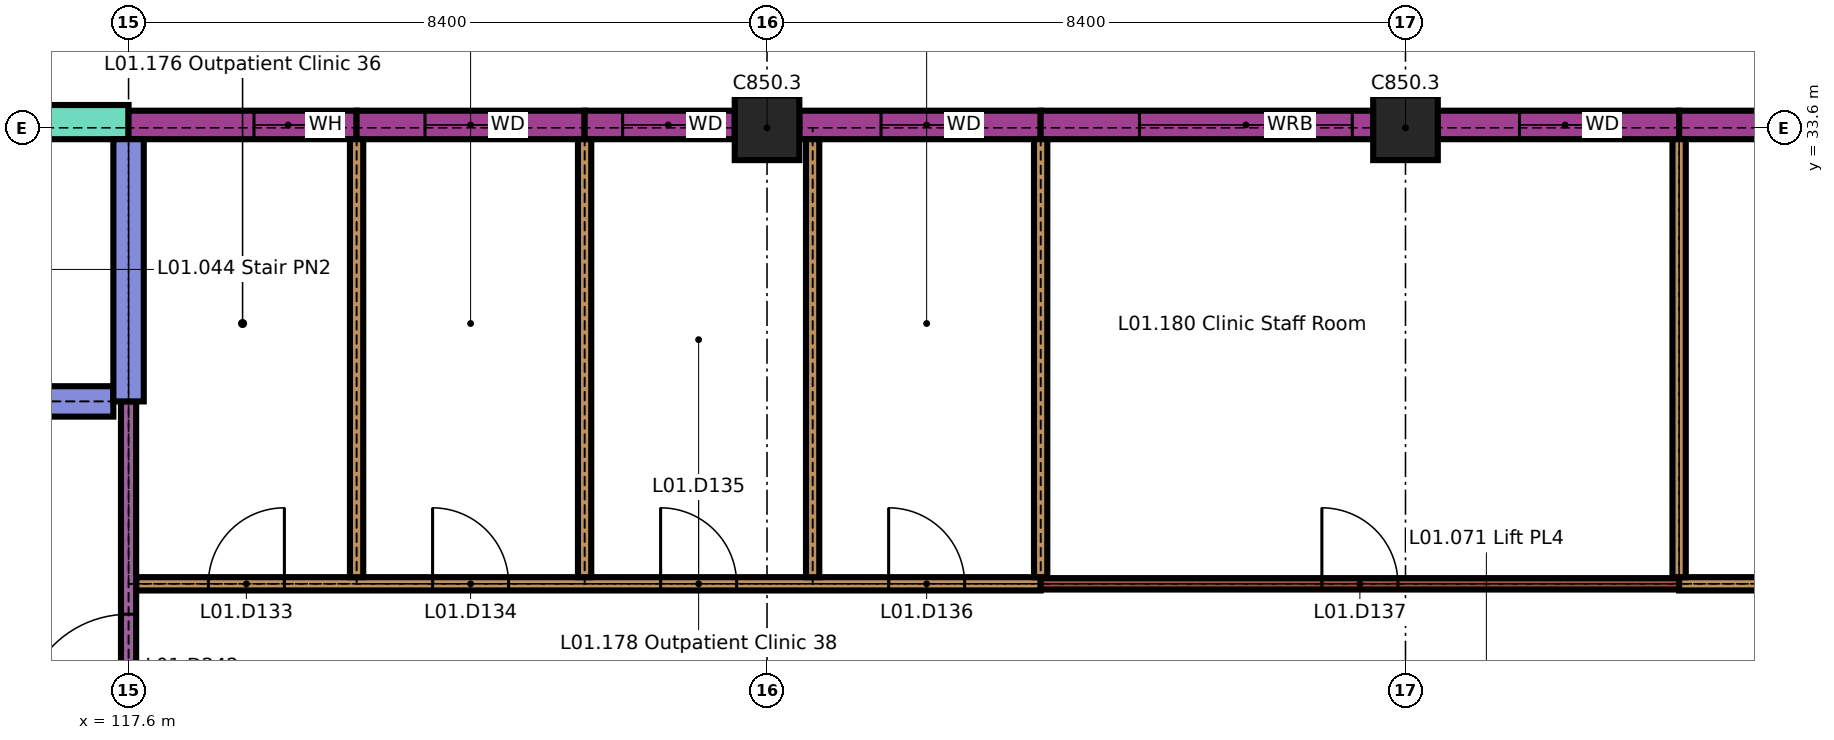
"""IFC4 building model, lengths in metres.
Left out: names, types, materials, properties, quantities, classifications, styles, units other than length and angle.
Written with IfcOpenShell. Run it as: python <this file> out.ifc"""

import sys

from ifc_helpers import new_model, si_unit, direction, frame, frame_2d, origin, origin_2d, place, context, subcontext, project, spatial, rectangle, extrude, element, fill, save


model = new_model("IFC4")
c1 = context("Model", 3, precision=1e-05, world=origin(), true_north=direction((0.0, 1.0)))
c2 = subcontext(c1, "Body", "Model", "MODEL_VIEW")
j1 = project(units=[si_unit("LENGTHUNIT", "METRE"), si_unit("PLANEANGLEUNIT", "RADIAN")], contexts=[c1])
p1 = place(None, origin())
s1 = spatial("IfcSite", under=j1, at=p1, CompositionType="ELEMENT")
p2 = place(p1, origin())
s2 = spatial("IfcBuilding", under=s1, at=p2, CompositionType="ELEMENT")
p3 = place(p2, frame((0.0, 0.0, 4.5)))
s3 = spatial("IfcBuildingStorey", under=s2, at=p3, CompositionType="ELEMENT", Elevation=4.5)
for number, where, z_axis, x_axis in (
    (1, (126.0, 33.6, 0.0), (0.0, 0.0, 1.0), (1.0, 0.0, 0.0)),
    (2, (134.4, 33.6, 0.0), (0.0, 0.0, 1.0), (1.0, 0.0, 0.0)),
):
    element("IfcColumn", number, at=place(p3, frame(where, z_axis=z_axis, x_axis=x_axis)), inside=s3, PredefinedType="COLUMN", context=c2, shape_type="SweptSolid", body=[
        extrude(rectangle(XDim=0.85, YDim=0.85, at=origin_2d()), origin(), (0.0, 0.0, 1.0), 3.45),
    ])
p4 = place(p3, frame((113.75, 33.675, 0.0), z_axis=(0.0, 0.0, 1.0), x_axis=(1.0, 0.0, 0.0)))
e3 = element("IfcWall", 3, at=p4, inside=s3, PredefinedType="SOLIDWALL", context=c2, shape_type="SweptSolid", body=[
    extrude(rectangle(XDim=3.85, YDim=0.45, at=frame_2d((1.925, 0.0))), origin(), (0.0, 0.0, 1.0), 3.45),
])
p5 = place(p3, frame((117.6, 33.637, 0.0), z_axis=(0.0, 0.0, 1.0), x_axis=(1.0, 0.0, 0.0)))
e4 = element("IfcWall", 4, at=p5, inside=s3, PredefinedType="SOLIDWALL", context=c2, shape_type="SweptSolid", body=[
    extrude(rectangle(XDim=3.0, YDim=0.375, at=frame_2d((1.5, 0.0))), origin(), (0.0, 0.0, 1.0), 3.15),
])
p6 = place(p5, frame((1.65, 0.0, 0.9)))
e5 = element("IfcOpeningElement", 5, at=p6, cuts=e4, PredefinedType="OPENING", context=c2, shape_type="SweptSolid", body=[
    extrude(rectangle(XDim=0.9, YDim=1.5, at=frame_2d((0.45, 0.75))), frame((0.0, 0.198, 0.0), z_axis=(0.0, -1.0, 0.0), x_axis=(1.0, 0.0, 0.0)), (0.0, 0.0, 1.0), 0.395),
])
p7 = place(p3, frame((120.6, 33.637, 0.0), z_axis=(0.0, 0.0, 1.0), x_axis=(1.0, 0.0, 0.0)))
e6 = element("IfcWall", 6, at=p7, inside=s3, PredefinedType="SOLIDWALL", context=c2, shape_type="SweptSolid", body=[
    extrude(rectangle(XDim=3.0, YDim=0.375, at=frame_2d((1.5, 0.0))), origin(), (0.0, 0.0, 1.0), 3.15),
])
p8 = place(p7, frame((0.9, 0.0, 0.9)))
e7 = element("IfcOpeningElement", 7, at=p8, cuts=e6, PredefinedType="OPENING", context=c2, shape_type="SweptSolid", body=[
    extrude(rectangle(XDim=1.2, YDim=1.5, at=frame_2d((0.6, 0.75))), frame((0.0, 0.198, 0.0), z_axis=(0.0, -1.0, 0.0), x_axis=(1.0, 0.0, 0.0)), (0.0, 0.0, 1.0), 0.395),
])
p9 = place(p3, frame((123.6, 33.637, 0.0), z_axis=(0.0, 0.0, 1.0), x_axis=(1.0, 0.0, 0.0)))
e8 = element("IfcWall", 8, at=p9, inside=s3, PredefinedType="SOLIDWALL", context=c2, shape_type="SweptSolid", body=[
    extrude(rectangle(XDim=1.975, YDim=0.375, at=frame_2d((0.987, 0.0))), origin(), (0.0, 0.0, 1.0), 3.15),
])
p10 = place(p9, frame((0.5, 0.0, 0.9)))
e9 = element("IfcOpeningElement", 9, at=p10, cuts=e8, PredefinedType="OPENING", context=c2, shape_type="SweptSolid", body=[
    extrude(rectangle(XDim=1.2, YDim=1.5, at=frame_2d((0.6, 0.75))), frame((0.0, 0.198, 0.0), z_axis=(0.0, -1.0, 0.0), x_axis=(1.0, 0.0, 0.0)), (0.0, 0.0, 1.0), 0.395),
])
p11 = place(p3, frame((126.425, 33.637, 0.0), z_axis=(0.0, 0.0, 1.0), x_axis=(1.0, 0.0, 0.0)))
e10 = element("IfcWall", 10, at=p11, inside=s3, PredefinedType="SOLIDWALL", context=c2, shape_type="SweptSolid", body=[
    extrude(rectangle(XDim=3.175, YDim=0.375, at=frame_2d((1.587, 0.0))), origin(), (0.0, 0.0, 1.0), 3.15),
])
p12 = place(p11, frame((1.075, 0.0, 0.9)))
e11 = element("IfcOpeningElement", 11, at=p12, cuts=e10, PredefinedType="OPENING", context=c2, shape_type="SweptSolid", body=[
    extrude(rectangle(XDim=1.2, YDim=1.5, at=frame_2d((0.6, 0.75))), frame((0.0, 0.198, 0.0), z_axis=(0.0, -1.0, 0.0), x_axis=(1.0, 0.0, 0.0)), (0.0, 0.0, 1.0), 0.395),
])
p13 = place(p3, frame((129.6, 33.637, 0.0), z_axis=(0.0, 0.0, 1.0), x_axis=(1.0, 0.0, 0.0)))
e12 = element("IfcWall", 12, at=p13, inside=s3, PredefinedType="SOLIDWALL", context=c2, shape_type="SweptSolid", body=[
    extrude(rectangle(XDim=4.375, YDim=0.375, at=frame_2d((2.188, 0.0))), origin(), (0.0, 0.0, 1.0), 3.15),
])
p14 = place(p13, frame((1.3, 0.0, 1.0)))
e13 = element("IfcOpeningElement", 13, at=p14, cuts=e12, PredefinedType="OPENING", context=c2, shape_type="SweptSolid", body=[
    extrude(rectangle(XDim=2.8, YDim=1.2, at=frame_2d((1.4, 0.6))), frame((0.0, 0.198, 0.0), z_axis=(0.0, -1.0, 0.0), x_axis=(1.0, 0.0, 0.0)), (0.0, 0.0, 1.0), 0.395),
])
p15 = place(p3, frame((134.825, 33.637, 0.0), z_axis=(0.0, 0.0, 1.0), x_axis=(1.0, 0.0, 0.0)))
e14 = element("IfcWall", 14, at=p15, inside=s3, PredefinedType="SOLIDWALL", context=c2, shape_type="SweptSolid", body=[
    extrude(rectangle(XDim=3.175, YDim=0.375, at=frame_2d((1.587, 0.0))), origin(), (0.0, 0.0, 1.0), 3.15),
])
p16 = place(p15, frame((1.075, 0.0, 0.9)))
e15 = element("IfcOpeningElement", 15, at=p16, cuts=e14, PredefinedType="OPENING", context=c2, shape_type="SweptSolid", body=[
    extrude(rectangle(XDim=1.2, YDim=1.5, at=frame_2d((0.6, 0.75))), frame((0.0, 0.198, 0.0), z_axis=(0.0, -1.0, 0.0), x_axis=(1.0, 0.0, 0.0)), (0.0, 0.0, 1.0), 0.395),
])
p17 = place(p3, frame((138.0, 33.637, 0.0), z_axis=(0.0, 0.0, 1.0), x_axis=(1.0, 0.0, 0.0)))
e16 = element("IfcWall", 16, at=p17, inside=s3, PredefinedType="SOLIDWALL", context=c2, shape_type="SweptSolid", body=[
    extrude(rectangle(XDim=4.375, YDim=0.375, at=frame_2d((2.188, 0.0))), origin(), (0.0, 0.0, 1.0), 3.15),
])
p18 = place(p17, frame((2.1, 0.0, 0.3)))
e17 = element("IfcOpeningElement", 17, at=p18, cuts=e16, PredefinedType="OPENING", context=c2, shape_type="SweptSolid", body=[
    extrude(rectangle(XDim=1.2, YDim=2.4, at=frame_2d((0.6, 1.2))), frame((0.0, 0.198, 0.0), z_axis=(0.0, -1.0, 0.0), x_axis=(1.0, 0.0, 0.0)), (0.0, 0.0, 1.0), 0.395),
])
p19 = place(p3, frame((117.7, 27.6, 0.0), z_axis=(0.0, 0.0, 1.0), x_axis=(1.0, 0.0, 0.0)))
e18 = element("IfcWall", 18, at=p19, inside=s3, PredefinedType="PARTITIONING", context=c2, shape_type="SweptSolid", body=[
    extrude(rectangle(XDim=11.9, YDim=0.175, at=frame_2d((5.95, 0.0))), origin(), (0.0, 0.0, 1.0), 3.45),
])
p20 = place(p19, frame((0.95, 0.0, 0.0)))
e19 = element("IfcOpeningElement", 19, at=p20, cuts=e18, PredefinedType="OPENING", context=c2, shape_type="SweptSolid", body=[
    extrude(rectangle(XDim=1.0, YDim=2.1, at=frame_2d((0.5, 1.05))), frame((0.0, 0.097, 0.0), z_axis=(0.0, -1.0, 0.0), x_axis=(1.0, 0.0, 0.0)), (0.0, 0.0, 1.0), 0.195),
])
p21 = place(p19, frame((3.9, 0.0, 0.0)))
e20 = element("IfcOpeningElement", 20, at=p21, cuts=e18, PredefinedType="OPENING", context=c2, shape_type="SweptSolid", body=[
    extrude(rectangle(XDim=1.0, YDim=2.1, at=frame_2d((0.5, 1.05))), frame((0.0, 0.097, 0.0), z_axis=(0.0, -1.0, 0.0), x_axis=(1.0, 0.0, 0.0)), (0.0, 0.0, 1.0), 0.195),
])
p22 = place(p19, frame((6.9, 0.0, 0.0)))
e21 = element("IfcOpeningElement", 21, at=p22, cuts=e18, PredefinedType="OPENING", context=c2, shape_type="SweptSolid", body=[
    extrude(rectangle(XDim=1.0, YDim=2.1, at=frame_2d((0.5, 1.05))), frame((0.0, 0.097, 0.0), z_axis=(0.0, -1.0, 0.0), x_axis=(1.0, 0.0, 0.0)), (0.0, 0.0, 1.0), 0.195),
])
p23 = place(p19, frame((9.9, 0.0, 0.0)))
e22 = element("IfcOpeningElement", 22, at=p23, cuts=e18, PredefinedType="OPENING", context=c2, shape_type="SweptSolid", body=[
    extrude(rectangle(XDim=1.0, YDim=2.1, at=frame_2d((0.5, 1.05))), frame((0.0, 0.097, 0.0), z_axis=(0.0, -1.0, 0.0), x_axis=(1.0, 0.0, 0.0)), (0.0, 0.0, 1.0), 0.195),
])
p24 = place(p3, frame((129.6, 27.6, 0.0), z_axis=(0.0, 0.0, 1.0), x_axis=(1.0, 0.0, 0.0)))
e23 = element("IfcWall", 23, at=p24, inside=s3, PredefinedType="PARTITIONING", context=c2, shape_type="SweptSolid", body=[
    extrude(rectangle(XDim=8.4, YDim=0.15, at=frame_2d((4.2, 0.0))), origin(), (0.0, 0.0, 1.0), 3.45),
])
p25 = place(p24, frame((3.7, 0.0, 0.0)))
e24 = element("IfcOpeningElement", 24, at=p25, cuts=e23, PredefinedType="OPENING", context=c2, shape_type="SweptSolid", body=[
    extrude(rectangle(XDim=1.0, YDim=2.1, at=frame_2d((0.5, 1.05))), frame((0.0, 0.085, 0.0), z_axis=(0.0, -1.0, 0.0), x_axis=(1.0, 0.0, 0.0)), (0.0, 0.0, 1.0), 0.17),
])
p26 = place(p3, frame((138.0, 27.6, 0.0), z_axis=(0.0, 0.0, 1.0), x_axis=(1.0, 0.0, 0.0)))
e25 = element("IfcWall", 25, at=p26, inside=s3, PredefinedType="PARTITIONING", context=c2, shape_type="SweptSolid", body=[
    extrude(rectangle(XDim=4.8, YDim=0.175, at=frame_2d((2.4, 0.0))), origin(), (0.0, 0.0, 1.0), 3.45),
])
p27 = place(p26, frame((1.9, 0.0, 0.0)))
e26 = element("IfcOpeningElement", 26, at=p27, cuts=e25, PredefinedType="OPENING", context=c2, shape_type="SweptSolid", body=[
    extrude(rectangle(XDim=1.0, YDim=2.1, at=frame_2d((0.5, 1.05))), frame((0.0, 0.097, 0.0), z_axis=(0.0, -1.0, 0.0), x_axis=(1.0, 0.0, 0.0)), (0.0, 0.0, 1.0), 0.195),
])
p28 = place(p3, frame((109.4, 30.0, 0.0), z_axis=(0.0, 0.0, 1.0), x_axis=(1.0, 0.0, 0.0)))
e27 = element("IfcWall", 27, at=p28, inside=s3, PredefinedType="SHEAR", context=c2, shape_type="SweptSolid", body=[
    extrude(rectangle(XDim=8.0, YDim=0.4, at=frame_2d((4.0, 0.0))), origin(), (0.0, 0.0, 1.0), 3.45),
])
p29 = place(p28, frame((0.4, 0.0, 0.0)))
e28 = element("IfcOpeningElement", 28, at=p29, cuts=e27, PredefinedType="OPENING", context=c2, shape_type="SweptSolid", body=[
    extrude(rectangle(XDim=1.2, YDim=2.1, at=frame_2d((0.6, 1.05))), frame((0.0, 0.21, 0.0), z_axis=(0.0, -1.0, 0.0), x_axis=(1.0, 0.0, 0.0)), (0.0, 0.0, 1.0), 0.42),
])
p30 = place(p3, frame((117.6, 25.4, 0.0), z_axis=(0.0, 0.0, 1.0), x_axis=(0.0, 1.0, 0.0)))
e29 = element("IfcWall", 29, at=p30, inside=s3, PredefinedType="PARTITIONING", context=c2, shape_type="SweptSolid", body=[
    extrude(rectangle(XDim=4.6, YDim=0.2, at=frame_2d((2.3, 0.0))), origin(), (0.0, 0.0, 1.0), 3.45),
])
p31 = place(p30, frame((0.4, 0.0, 0.0)))
e30 = element("IfcOpeningElement", 30, at=p31, cuts=e29, PredefinedType="OPENING", context=c2, shape_type="SweptSolid", body=[
    extrude(rectangle(XDim=1.4, YDim=2.1, at=frame_2d((0.7, 1.05))), frame((0.0, 0.11, 0.0), z_axis=(0.0, -1.0, 0.0), x_axis=(1.0, 0.0, 0.0)), (0.0, 0.0, 1.0), 0.22),
])
p32 = place(p3, frame((117.6, 30.0, 0.0), z_axis=(0.0, 0.0, 1.0), x_axis=(0.0, 1.0, 0.0)))
e31 = element("IfcWall", 31, at=p32, inside=s3, PredefinedType="SHEAR", context=c2, shape_type="SweptSolid", body=[
    extrude(rectangle(XDim=3.45, YDim=0.4, at=frame_2d((1.725, 0.0))), origin(), (0.0, 0.0, 1.0), 3.45),
])
for number, where, z_axis, x_axis in (
    (32, (120.6, 27.688, 0.0), (0.0, 0.0, 1.0), (0.0, 1.0, 0.0)),
    (33, (123.6, 27.688, 0.0), (0.0, 0.0, 1.0), (0.0, 1.0, 0.0)),
    (34, (126.6, 27.688, 0.0), (0.0, 0.0, 1.0), (0.0, 1.0, 0.0)),
    (35, (129.6, 27.688, 0.0), (0.0, 0.0, 1.0), (0.0, 1.0, 0.0)),
    (36, (138.0, 27.688, 0.0), (0.0, 0.0, 1.0), (0.0, 1.0, 0.0)),
):
    element("IfcWall", number, at=place(p3, frame(where, z_axis=z_axis, x_axis=x_axis)), inside=s3, PredefinedType="PARTITIONING", context=c2, shape_type="SweptSolid", body=[
        extrude(rectangle(XDim=5.762, YDim=0.175, at=frame_2d((2.881, 0.0))), origin(), (0.0, 0.0, 1.0), 3.45),
    ])
p33 = place(p6, origin())
e37 = element("IfcWindow", 37, at=p33, inside=s3, PartitioningType="SINGLE_PANEL", PredefinedType="WINDOW", context=c2, shape_type="SweptSolid", body=[
    extrude(rectangle(XDim=0.9, YDim=1.5, at=frame_2d((0.45, 0.75))), frame((0.0, 0.03, 0.0), z_axis=(0.0, -1.0, 0.0), x_axis=(1.0, 0.0, 0.0)), (0.0, 0.0, 1.0), 0.06),
])
fill(e5, e37)
p34 = place(p8, origin())
e38 = element("IfcWindow", 38, at=p34, inside=s3, PartitioningType="SINGLE_PANEL", PredefinedType="WINDOW", context=c2, shape_type="SweptSolid", body=[
    extrude(rectangle(XDim=1.2, YDim=1.5, at=frame_2d((0.6, 0.75))), frame((0.0, 0.03, 0.0), z_axis=(0.0, -1.0, 0.0), x_axis=(1.0, 0.0, 0.0)), (0.0, 0.0, 1.0), 0.06),
])
fill(e7, e38)
p35 = place(p10, origin())
e39 = element("IfcWindow", 39, at=p35, inside=s3, PartitioningType="SINGLE_PANEL", PredefinedType="WINDOW", context=c2, shape_type="SweptSolid", body=[
    extrude(rectangle(XDim=1.2, YDim=1.5, at=frame_2d((0.6, 0.75))), frame((0.0, 0.03, 0.0), z_axis=(0.0, -1.0, 0.0), x_axis=(1.0, 0.0, 0.0)), (0.0, 0.0, 1.0), 0.06),
])
fill(e9, e39)
p36 = place(p12, origin())
e40 = element("IfcWindow", 40, at=p36, inside=s3, PartitioningType="SINGLE_PANEL", PredefinedType="WINDOW", context=c2, shape_type="SweptSolid", body=[
    extrude(rectangle(XDim=1.2, YDim=1.5, at=frame_2d((0.6, 0.75))), frame((0.0, 0.03, 0.0), z_axis=(0.0, -1.0, 0.0), x_axis=(1.0, 0.0, 0.0)), (0.0, 0.0, 1.0), 0.06),
])
fill(e11, e40)
p37 = place(p14, origin())
e41 = element("IfcWindow", 41, at=p37, inside=s3, PartitioningType="DOUBLE_PANEL_VERTICAL", PredefinedType="WINDOW", context=c2, shape_type="SweptSolid", body=[
    extrude(rectangle(XDim=2.8, YDim=1.2, at=frame_2d((1.4, 0.6))), frame((0.0, 0.03, 0.0), z_axis=(0.0, -1.0, 0.0), x_axis=(1.0, 0.0, 0.0)), (0.0, 0.0, 1.0), 0.06),
])
fill(e13, e41)
p38 = place(p16, origin())
e42 = element("IfcWindow", 42, at=p38, inside=s3, PartitioningType="SINGLE_PANEL", PredefinedType="WINDOW", context=c2, shape_type="SweptSolid", body=[
    extrude(rectangle(XDim=1.2, YDim=1.5, at=frame_2d((0.6, 0.75))), frame((0.0, 0.03, 0.0), z_axis=(0.0, -1.0, 0.0), x_axis=(1.0, 0.0, 0.0)), (0.0, 0.0, 1.0), 0.06),
])
fill(e15, e42)
p39 = place(p20, origin())
e43 = element("IfcDoor", 43, at=p39, inside=s3, OperationType="SINGLE_SWING_LEFT", PredefinedType="DOOR", context=c2, shape_type="SweptSolid", body=[
    extrude(rectangle(XDim=1.0, YDim=2.1, at=frame_2d((0.5, 1.05))), frame((0.0, 0.035, 0.0), z_axis=(0.0, -1.0, 0.0), x_axis=(1.0, 0.0, 0.0)), (0.0, 0.0, 1.0), 0.07),
])
fill(e19, e43)
p40 = place(p21, origin())
e44 = element("IfcDoor", 44, at=p40, inside=s3, OperationType="SINGLE_SWING_RIGHT", PredefinedType="DOOR", context=c2, shape_type="SweptSolid", body=[
    extrude(rectangle(XDim=1.0, YDim=2.1, at=frame_2d((0.5, 1.05))), frame((0.0, 0.035, 0.0), z_axis=(0.0, -1.0, 0.0), x_axis=(1.0, 0.0, 0.0)), (0.0, 0.0, 1.0), 0.07),
])
fill(e20, e44)
p41 = place(p22, origin())
e45 = element("IfcDoor", 45, at=p41, inside=s3, OperationType="SINGLE_SWING_RIGHT", PredefinedType="DOOR", context=c2, shape_type="SweptSolid", body=[
    extrude(rectangle(XDim=1.0, YDim=2.1, at=frame_2d((0.5, 1.05))), frame((0.0, 0.035, 0.0), z_axis=(0.0, -1.0, 0.0), x_axis=(1.0, 0.0, 0.0)), (0.0, 0.0, 1.0), 0.07),
])
fill(e21, e45)
p42 = place(p23, origin())
e46 = element("IfcDoor", 46, at=p42, inside=s3, OperationType="SINGLE_SWING_RIGHT", PredefinedType="DOOR", context=c2, shape_type="SweptSolid", body=[
    extrude(rectangle(XDim=1.0, YDim=2.1, at=frame_2d((0.5, 1.05))), frame((0.0, 0.035, 0.0), z_axis=(0.0, -1.0, 0.0), x_axis=(1.0, 0.0, 0.0)), (0.0, 0.0, 1.0), 0.07),
])
fill(e22, e46)
p43 = place(p25, origin())
e47 = element("IfcDoor", 47, at=p43, inside=s3, OperationType="SINGLE_SWING_RIGHT", PredefinedType="DOOR", context=c2, shape_type="SweptSolid", body=[
    extrude(rectangle(XDim=1.0, YDim=2.1, at=frame_2d((0.5, 1.05))), frame((0.0, 0.025, 0.0), z_axis=(0.0, -1.0, 0.0), x_axis=(1.0, 0.0, 0.0)), (0.0, 0.0, 1.0), 0.05),
])
fill(e24, e47)
p44 = place(p31, origin())
e48 = element("IfcDoor", 48, at=p44, inside=s3, OperationType="SINGLE_SWING_RIGHT", PredefinedType="DOOR", context=c2, shape_type="SweptSolid", body=[
    extrude(rectangle(XDim=1.4, YDim=2.1, at=frame_2d((0.7, 1.05))), frame((0.0, 0.03, 0.0), z_axis=(0.0, -1.0, 0.0), x_axis=(1.0, 0.0, 0.0)), (0.0, 0.0, 1.0), 0.06),
])
fill(e30, e48)
save(model, sys.argv[1])
